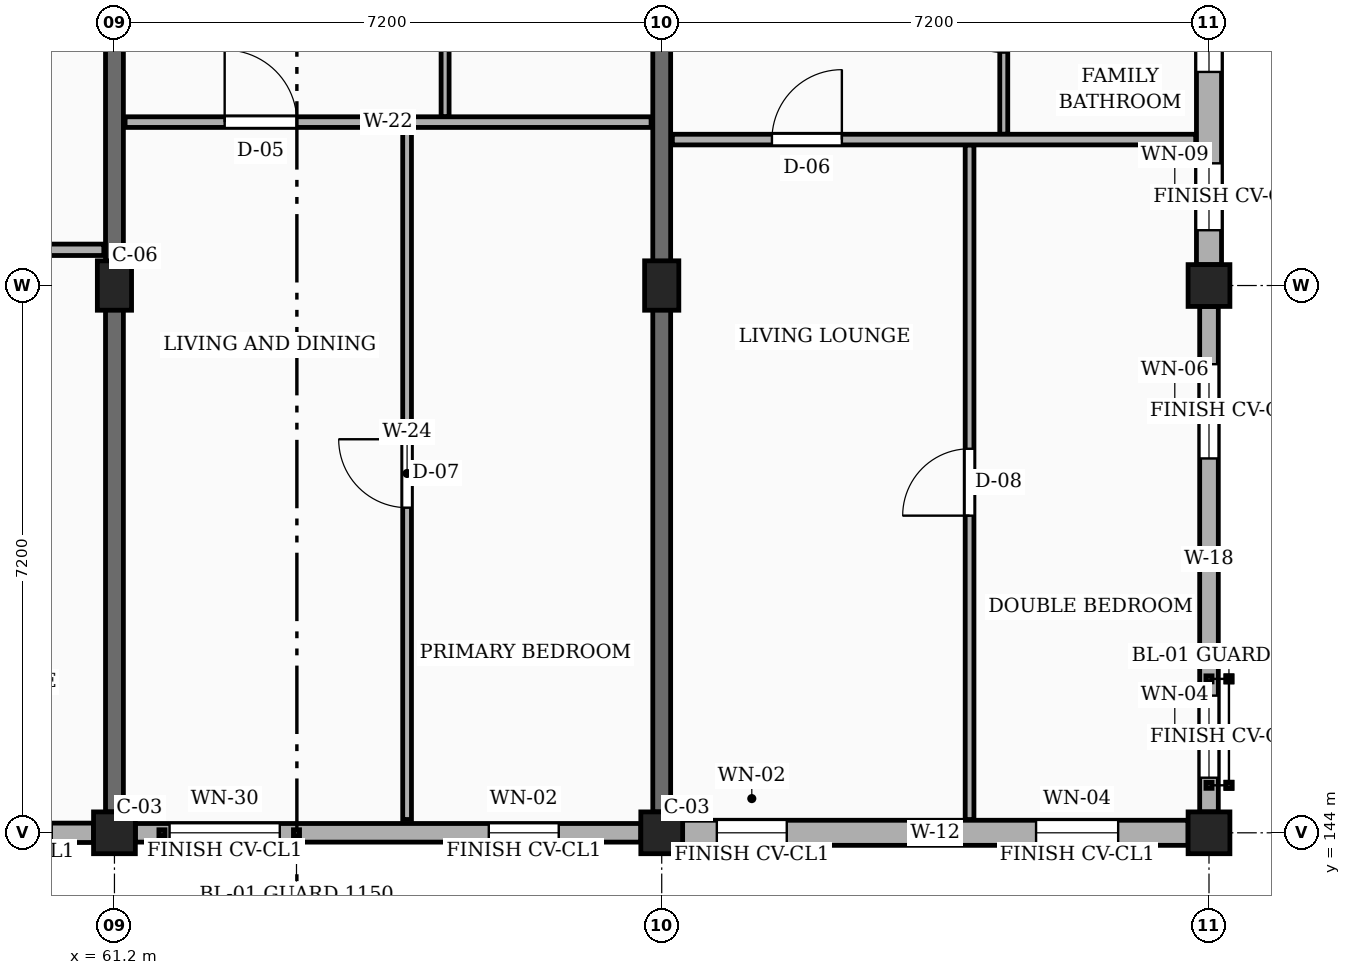
"""IFC4 building model, lengths in metres.
Left out: names, types, materials, properties, quantities, classifications, styles, units other than length and angle.
Written with IfcOpenShell. Run it as: python <this file> out.ifc"""

import sys

from ifc_helpers import new_model, si_unit, direction, frame, frame_2d, origin, origin_2d, place, context, subcontext, project, spatial, rectangle, extrude, element, fill, save


model = new_model("IFC4")
c1 = context("Model", 3, precision=1e-05, world=origin(), true_north=direction((0.0, 1.0)))
c2 = subcontext(c1, "Body", "Model", "MODEL_VIEW")
j1 = project(units=[si_unit("LENGTHUNIT", "METRE"), si_unit("PLANEANGLEUNIT", "RADIAN")], contexts=[c1])
p1 = place(None, origin())
s1 = spatial("IfcSite", under=j1, at=p1, CompositionType="ELEMENT")
p2 = place(p1, origin())
s2 = spatial("IfcBuilding", under=s1, at=p2, CompositionType="ELEMENT")
p3 = place(p2, frame((0.0, 0.0, 20.25)))
s3 = spatial("IfcBuildingStorey", under=s2, at=p3, CompositionType="ELEMENT", Elevation=20.25)
p4 = place(p3, frame((61.2, 144.0, 0.0), z_axis=(0.0, 0.0, 1.0), x_axis=(1.0, 0.0, 0.0)))
e1 = element("IfcColumn", 1, at=p4, inside=s3, PredefinedType="COLUMN", context=c2, shape_type="SweptSolid", body=[
    extrude(rectangle(XDim=0.55, YDim=0.55, at=origin_2d()), origin(), (0.0, 0.0, 1.0), 3.15),
])
p5 = place(p3, frame((61.2, 151.2, 0.0), z_axis=(0.0, 0.0, 1.0), x_axis=(1.0, 0.0, 0.0)))
e2 = element("IfcColumn", 2, at=p5, inside=s3, PredefinedType="COLUMN", context=c2, shape_type="SweptSolid", body=[
    extrude(rectangle(XDim=0.45, YDim=0.65, at=origin_2d()), origin(), (0.0, 0.0, 1.0), 3.15),
])
p6 = place(p3, frame((68.4, 144.0, 0.0), z_axis=(0.0, 0.0, 1.0), x_axis=(1.0, 0.0, 0.0)))
e3 = element("IfcColumn", 3, at=p6, inside=s3, PredefinedType="COLUMN", context=c2, shape_type="SweptSolid", body=[
    extrude(rectangle(XDim=0.55, YDim=0.55, at=origin_2d()), origin(), (0.0, 0.0, 1.0), 3.15),
])
p7 = place(p3, frame((68.4, 151.2, 0.0), z_axis=(0.0, 0.0, 1.0), x_axis=(1.0, 0.0, 0.0)))
e4 = element("IfcColumn", 4, at=p7, inside=s3, PredefinedType="COLUMN", context=c2, shape_type="SweptSolid", body=[
    extrude(rectangle(XDim=0.45, YDim=0.65, at=origin_2d()), origin(), (0.0, 0.0, 1.0), 3.15),
])
for number, where, z_axis, x_axis in (
    (5, (75.6, 144.0, 0.0), (0.0, 0.0, 1.0), (1.0, 0.0, 0.0)),
    (6, (75.6, 151.2, 0.0), (0.0, 0.0, 1.0), (1.0, 0.0, 0.0)),
):
    element("IfcColumn", number, at=place(p3, frame(where, z_axis=z_axis, x_axis=x_axis)), inside=s3, PredefinedType="COLUMN", context=c2, shape_type="SweptSolid", body=[
        extrude(rectangle(XDim=0.55, YDim=0.55, at=origin_2d()), origin(), (0.0, 0.0, 1.0), 3.15),
    ])
for number, where, z_axis, x_axis in (
    (7, (61.2, 144.275, 0.0), (0.0, 0.0, 1.0), (0.0, 1.0, 0.0)),
    (8, (68.4, 144.275, 0.0), (0.0, 0.0, 1.0), (0.0, 1.0, 0.0)),
):
    element("IfcWall", number, at=place(p3, frame(where, z_axis=z_axis, x_axis=x_axis)), inside=s3, PredefinedType="SOLIDWALL", context=c2, shape_type="SweptSolid", body=[
        extrude(rectangle(XDim=11.875, YDim=0.235, at=frame_2d((5.938, 0.0))), origin(), (0.0, 0.0, 1.0), 2.185),
    ])
p8 = place(p3, frame((54.275, 144.0, 0.0), z_axis=(0.0, 0.0, 1.0), x_axis=(1.0, 0.0, 0.0)))
e9 = element("IfcWall", 9, at=p8, inside=s3, PredefinedType="SOLIDWALL", context=c2, shape_type="SweptSolid", body=[
    extrude(rectangle(XDim=6.65, YDim=0.255, at=frame_2d((3.325, 0.0))), origin(), (0.0, 0.0, 1.0), 2.455),
])
p9 = place(p8, frame((0.45, 0.0, 0.78)))
e10 = element("IfcOpeningElement", 10, at=p9, cuts=e9, PredefinedType="OPENING", context=c2, shape_type="SweptSolid", body=[
    extrude(rectangle(XDim=1.25, YDim=1.44, at=frame_2d((0.625, 0.72))), frame((0.0, 0.137, 0.0), z_axis=(0.0, -1.0, 0.0), x_axis=(1.0, 0.0, 0.0)), (0.0, 0.0, 1.0), 0.275),
])
p10 = place(p8, frame((4.65, 0.0, 0.78)))
e11 = element("IfcOpeningElement", 11, at=p10, cuts=e9, PredefinedType="OPENING", context=c2, shape_type="SweptSolid", body=[
    extrude(rectangle(XDim=1.45, YDim=1.44, at=frame_2d((0.725, 0.72))), frame((0.0, 0.137, 0.0), z_axis=(0.0, -1.0, 0.0), x_axis=(1.0, 0.0, 0.0)), (0.0, 0.0, 1.0), 0.275),
])
p11 = place(p3, frame((61.475, 144.0, 0.0), z_axis=(0.0, 0.0, 1.0), x_axis=(1.0, 0.0, 0.0)))
e12 = element("IfcWall", 12, at=p11, inside=s3, PredefinedType="SOLIDWALL", context=c2, shape_type="SweptSolid", body=[
    extrude(rectangle(XDim=6.65, YDim=0.245, at=frame_2d((3.325, 0.0))), origin(), (0.0, 0.0, 1.0), 2.455),
])
p12 = place(p11, frame((0.45, 0.0, 0.78)))
e13 = element("IfcOpeningElement", 13, at=p12, cuts=e12, PredefinedType="OPENING", context=c2, shape_type="SweptSolid", body=[
    extrude(rectangle(XDim=1.45, YDim=1.44, at=frame_2d((0.725, 0.72))), frame((0.0, 0.133, 0.0), z_axis=(0.0, -1.0, 0.0), x_axis=(1.0, 0.0, 0.0)), (0.0, 0.0, 1.0), 0.265),
])
p13 = place(p11, frame((4.65, 0.0, 0.78)))
e14 = element("IfcOpeningElement", 14, at=p13, cuts=e12, PredefinedType="OPENING", context=c2, shape_type="SweptSolid", body=[
    extrude(rectangle(XDim=0.92, YDim=1.15, at=frame_2d((0.46, 0.575))), frame((0.0, 0.133, 0.0), z_axis=(0.0, -1.0, 0.0), x_axis=(1.0, 0.0, 0.0)), (0.0, 0.0, 1.0), 0.265),
])
p14 = place(p3, frame((68.675, 144.0, 0.0), z_axis=(0.0, 0.0, 1.0), x_axis=(1.0, 0.0, 0.0)))
e15 = element("IfcWall", 15, at=p14, inside=s3, PredefinedType="SOLIDWALL", context=c2, shape_type="SweptSolid", body=[
    extrude(rectangle(XDim=6.65, YDim=0.33, at=frame_2d((3.325, 0.0))), origin(), (0.0, 0.0, 1.0), 2.455),
])
p15 = place(p14, frame((0.45, 0.0, 0.78)))
e16 = element("IfcOpeningElement", 16, at=p15, cuts=e15, PredefinedType="OPENING", context=c2, shape_type="SweptSolid", body=[
    extrude(rectangle(XDim=0.92, YDim=1.15, at=frame_2d((0.46, 0.575))), frame((0.0, 0.175, 0.0), z_axis=(0.0, -1.0, 0.0), x_axis=(1.0, 0.0, 0.0)), (0.0, 0.0, 1.0), 0.35),
])
p16 = place(p14, frame((4.65, 0.0, 0.78)))
e17 = element("IfcOpeningElement", 17, at=p16, cuts=e15, PredefinedType="OPENING", context=c2, shape_type="SweptSolid", body=[
    extrude(rectangle(XDim=1.08, YDim=1.15, at=frame_2d((0.54, 0.575))), frame((0.0, 0.175, 0.0), z_axis=(0.0, -1.0, 0.0), x_axis=(1.0, 0.0, 0.0)), (0.0, 0.0, 1.0), 0.35),
])
p17 = place(p3, frame((75.6, 144.275, 0.0), z_axis=(0.0, 0.0, 1.0), x_axis=(0.0, 1.0, 0.0)))
e18 = element("IfcWall", 18, at=p17, inside=s3, PredefinedType="SOLIDWALL", context=c2, shape_type="SweptSolid", body=[
    extrude(rectangle(XDim=6.65, YDim=0.245, at=frame_2d((3.325, 0.0))), origin(), (0.0, 0.0, 1.0), 2.455),
])
p18 = place(p17, frame((0.45, 0.0, 0.78)))
e19 = element("IfcOpeningElement", 19, at=p18, cuts=e18, PredefinedType="OPENING", context=c2, shape_type="SweptSolid", body=[
    extrude(rectangle(XDim=1.08, YDim=1.15, at=frame_2d((0.54, 0.575))), frame((0.0, 0.133, 0.0), z_axis=(0.0, -1.0, 0.0), x_axis=(1.0, 0.0, 0.0)), (0.0, 0.0, 1.0), 0.265),
])
p19 = place(p17, frame((4.65, 0.0, 0.78)))
e20 = element("IfcOpeningElement", 20, at=p19, cuts=e18, PredefinedType="OPENING", context=c2, shape_type="SweptSolid", body=[
    extrude(rectangle(XDim=1.24, YDim=1.15, at=frame_2d((0.62, 0.575))), frame((0.0, 0.133, 0.0), z_axis=(0.0, -1.0, 0.0), x_axis=(1.0, 0.0, 0.0)), (0.0, 0.0, 1.0), 0.265),
])
p20 = place(p3, frame((75.6, 151.475, 0.0), z_axis=(0.0, 0.0, 1.0), x_axis=(0.0, 1.0, 0.0)))
e21 = element("IfcWall", 21, at=p20, inside=s3, PredefinedType="SOLIDWALL", context=c2, shape_type="SweptSolid", body=[
    extrude(rectangle(XDim=6.65, YDim=0.33, at=frame_2d((3.325, 0.0))), origin(), (0.0, 0.0, 1.0), 2.455),
])
p21 = place(p20, frame((0.452, 0.0, 0.78)))
e22 = element("IfcOpeningElement", 22, at=p21, cuts=e21, PredefinedType="OPENING", context=c2, shape_type="SweptSolid", body=[
    extrude(rectangle(XDim=0.88, YDim=1.26, at=frame_2d((0.44, 0.63))), frame((0.0, 0.175, 0.0), z_axis=(0.0, -1.0, 0.0), x_axis=(1.0, 0.0, 0.0)), (0.0, 0.0, 1.0), 0.35),
])
p22 = place(p20, frame((2.535, 0.0, 0.78)))
e23 = element("IfcOpeningElement", 23, at=p22, cuts=e21, PredefinedType="OPENING", context=c2, shape_type="SweptSolid", body=[
    extrude(rectangle(XDim=1.4, YDim=1.15, at=frame_2d((0.7, 0.575))), frame((0.0, 0.175, 0.0), z_axis=(0.0, -1.0, 0.0), x_axis=(1.0, 0.0, 0.0)), (0.0, 0.0, 1.0), 0.35),
])
p23 = place(p20, frame((5.188, 0.0, 0.78)))
e24 = element("IfcOpeningElement", 24, at=p23, cuts=e21, PredefinedType="OPENING", context=c2, shape_type="SweptSolid", body=[
    extrude(rectangle(XDim=0.96, YDim=1.26, at=frame_2d((0.48, 0.63))), frame((0.0, 0.175, 0.0), z_axis=(0.0, -1.0, 0.0), x_axis=(1.0, 0.0, 0.0)), (0.0, 0.0, 1.0), 0.35),
])
p24 = place(p3, frame((54.14, 151.67, 0.0), z_axis=(0.0, 0.0, 1.0), x_axis=(1.0, 0.0, 0.0)))
e25 = element("IfcWall", 25, at=p24, inside=s3, PredefinedType="PARTITIONING", context=c2, shape_type="SweptSolid", body=[
    extrude(rectangle(XDim=6.92, YDim=0.15, at=frame_2d((3.46, 0.0))), origin(), (0.0, 0.0, 1.0), 2.32),
])
p25 = place(p24, frame((4.66, 0.0, 0.0)))
e26 = element("IfcOpeningElement", 26, at=p25, cuts=e25, PredefinedType="OPENING", context=c2, shape_type="SweptSolid", body=[
    extrude(rectangle(XDim=0.95, YDim=2.1, at=frame_2d((0.475, 1.05))), frame((0.0, 0.085, 0.0), z_axis=(0.0, -1.0, 0.0), x_axis=(1.0, 0.0, 0.0)), (0.0, 0.0, 1.0), 0.17),
])
p26 = place(p3, frame((65.05, 144.175, 0.0), z_axis=(0.0, 0.0, 1.0), x_axis=(0.0, 1.0, 0.0)))
e27 = element("IfcWall", 27, at=p26, inside=s3, PredefinedType="PARTITIONING", context=c2, shape_type="SweptSolid", body=[
    extrude(rectangle(XDim=9.105, YDim=0.115, at=frame_2d((4.552, 0.0))), origin(), (0.0, 0.0, 1.0), 2.32),
])
p27 = place(p26, frame((4.103, 0.0, 0.0)))
e28 = element("IfcOpeningElement", 28, at=p27, cuts=e27, PredefinedType="OPENING", context=c2, shape_type="SweptSolid", body=[
    extrude(rectangle(XDim=0.9, YDim=2.1, at=frame_2d((0.45, 1.05))), frame((0.0, 0.067, 0.0), z_axis=(0.0, -1.0, 0.0), x_axis=(1.0, 0.0, 0.0)), (0.0, 0.0, 1.0), 0.135),
])
p28 = place(p3, frame((65.55, 153.42, 0.0), z_axis=(0.0, 0.0, 1.0), x_axis=(0.0, 1.0, 0.0)))
e29 = element("IfcWall", 29, at=p28, inside=s3, PredefinedType="PARTITIONING", context=c2, shape_type="SweptSolid", body=[
    extrude(rectangle(XDim=2.79, YDim=0.105, at=frame_2d((1.395, 0.0))), origin(), (0.0, 0.0, 1.0), 2.32),
])
p29 = place(p28, frame((0.945, 0.0, 0.0)))
e30 = element("IfcOpeningElement", 30, at=p29, cuts=e29, PredefinedType="OPENING", context=c2, shape_type="SweptSolid", body=[
    extrude(rectangle(XDim=0.9, YDim=2.05, at=frame_2d((0.45, 1.025))), frame((0.0, 0.062, 0.0), z_axis=(0.0, -1.0, 0.0), x_axis=(1.0, 0.0, 0.0)), (0.0, 0.0, 1.0), 0.125),
])
p30 = place(p3, frame((61.34, 153.35, 0.0), z_axis=(0.0, 0.0, 1.0), x_axis=(1.0, 0.0, 0.0)))
e31 = element("IfcWall", 31, at=p30, inside=s3, PredefinedType="PARTITIONING", context=c2, shape_type="SweptSolid", body=[
    extrude(rectangle(XDim=6.92, YDim=0.14, at=frame_2d((3.46, 0.0))), origin(), (0.0, 0.0, 1.0), 2.32),
])
p31 = place(p30, frame((1.31, 0.0, 0.0)))
e32 = element("IfcOpeningElement", 32, at=p31, cuts=e31, PredefinedType="OPENING", context=c2, shape_type="SweptSolid", body=[
    extrude(rectangle(XDim=0.95, YDim=2.1, at=frame_2d((0.475, 1.05))), frame((0.0, 0.08, 0.0), z_axis=(0.0, -1.0, 0.0), x_axis=(1.0, 0.0, 0.0)), (0.0, 0.0, 1.0), 0.16),
])
p32 = place(p3, frame((72.45, 144.175, 0.0), z_axis=(0.0, 0.0, 1.0), x_axis=(0.0, 1.0, 0.0)))
e33 = element("IfcWall", 33, at=p32, inside=s3, PredefinedType="PARTITIONING", context=c2, shape_type="SweptSolid", body=[
    extrude(rectangle(XDim=8.875, YDim=0.115, at=frame_2d((4.438, 0.0))), origin(), (0.0, 0.0, 1.0), 2.32),
])
p33 = place(p32, frame((3.998, 0.0, 0.0)))
e34 = element("IfcOpeningElement", 34, at=p33, cuts=e33, PredefinedType="OPENING", context=c2, shape_type="SweptSolid", body=[
    extrude(rectangle(XDim=0.88, YDim=2.08, at=frame_2d((0.44, 1.04))), frame((0.0, 0.067, 0.0), z_axis=(0.0, -1.0, 0.0), x_axis=(1.0, 0.0, 0.0)), (0.0, 0.0, 1.0), 0.135),
])
p34 = place(p3, frame((72.9, 153.19, 0.0), z_axis=(0.0, 0.0, 1.0), x_axis=(0.0, 1.0, 0.0)))
e35 = element("IfcWall", 35, at=p34, inside=s3, PredefinedType="PARTITIONING", context=c2, shape_type="SweptSolid", body=[
    extrude(rectangle(XDim=3.02, YDim=0.105, at=frame_2d((1.51, 0.0))), origin(), (0.0, 0.0, 1.0), 2.32),
])
p35 = place(p34, frame((1.075, 0.0, 0.0)))
e36 = element("IfcOpeningElement", 36, at=p35, cuts=e35, PredefinedType="OPENING", context=c2, shape_type="SweptSolid", body=[
    extrude(rectangle(XDim=0.87, YDim=2.05, at=frame_2d((0.435, 1.025))), frame((0.0, 0.062, 0.0), z_axis=(0.0, -1.0, 0.0), x_axis=(1.0, 0.0, 0.0)), (0.0, 0.0, 1.0), 0.125),
])
p36 = place(p3, frame((68.54, 153.12, 0.0), z_axis=(0.0, 0.0, 1.0), x_axis=(1.0, 0.0, 0.0)))
e37 = element("IfcWall", 37, at=p36, inside=s3, PredefinedType="PARTITIONING", context=c2, shape_type="SweptSolid", body=[
    extrude(rectangle(XDim=6.885, YDim=0.14, at=frame_2d((3.442, 0.0))), origin(), (0.0, 0.0, 1.0), 2.32),
])
p37 = place(p36, frame((1.31, 0.0, 0.0)))
e38 = element("IfcOpeningElement", 38, at=p37, cuts=e37, PredefinedType="OPENING", context=c2, shape_type="SweptSolid", body=[
    extrude(rectangle(XDim=0.92, YDim=2.1, at=frame_2d((0.46, 1.05))), frame((0.0, 0.08, 0.0), z_axis=(0.0, -1.0, 0.0), x_axis=(1.0, 0.0, 0.0)), (0.0, 0.0, 1.0), 0.16),
])
p38 = place(p12, origin())
e39 = element("IfcWindow", 39, at=p38, inside=s3, PartitioningType="SINGLE_PANEL", PredefinedType="WINDOW", context=c2, shape_type="SweptSolid", body=[
    extrude(rectangle(XDim=1.45, YDim=1.44, at=frame_2d((0.725, 0.72))), frame((0.0, 0.03, 0.0), z_axis=(0.0, -1.0, 0.0), x_axis=(1.0, 0.0, 0.0)), (0.0, 0.0, 1.0), 0.06),
])
fill(e13, e39)
p39 = place(p13, origin())
e40 = element("IfcWindow", 40, at=p39, inside=s3, PartitioningType="SINGLE_PANEL", PredefinedType="WINDOW", context=c2, shape_type="SweptSolid", body=[
    extrude(rectangle(XDim=0.92, YDim=1.15, at=frame_2d((0.46, 0.575))), frame((0.0, 0.03, 0.0), z_axis=(0.0, -1.0, 0.0), x_axis=(1.0, 0.0, 0.0)), (0.0, 0.0, 1.0), 0.06),
])
fill(e14, e40)
p40 = place(p15, origin())
e41 = element("IfcWindow", 41, at=p40, inside=s3, PartitioningType="SINGLE_PANEL", PredefinedType="WINDOW", context=c2, shape_type="SweptSolid", body=[
    extrude(rectangle(XDim=0.92, YDim=1.15, at=frame_2d((0.46, 0.575))), frame((0.0, 0.03, 0.0), z_axis=(0.0, -1.0, 0.0), x_axis=(1.0, 0.0, 0.0)), (0.0, 0.0, 1.0), 0.06),
])
fill(e16, e41)
p41 = place(p16, origin())
e42 = element("IfcWindow", 42, at=p41, inside=s3, PartitioningType="SINGLE_PANEL", PredefinedType="WINDOW", context=c2, shape_type="SweptSolid", body=[
    extrude(rectangle(XDim=1.08, YDim=1.15, at=frame_2d((0.54, 0.575))), frame((0.0, 0.03, 0.0), z_axis=(0.0, -1.0, 0.0), x_axis=(1.0, 0.0, 0.0)), (0.0, 0.0, 1.0), 0.06),
])
fill(e17, e42)
p42 = place(p18, origin())
e43 = element("IfcWindow", 43, at=p42, inside=s3, PartitioningType="SINGLE_PANEL", PredefinedType="WINDOW", context=c2, shape_type="SweptSolid", body=[
    extrude(rectangle(XDim=1.08, YDim=1.15, at=frame_2d((0.54, 0.575))), frame((0.0, 0.03, 0.0), z_axis=(0.0, -1.0, 0.0), x_axis=(1.0, 0.0, 0.0)), (0.0, 0.0, 1.0), 0.06),
])
fill(e19, e43)
p43 = place(p19, origin())
e44 = element("IfcWindow", 44, at=p43, inside=s3, PartitioningType="SINGLE_PANEL", PredefinedType="WINDOW", context=c2, shape_type="SweptSolid", body=[
    extrude(rectangle(XDim=1.24, YDim=1.15, at=frame_2d((0.62, 0.575))), frame((0.0, 0.03, 0.0), z_axis=(0.0, -1.0, 0.0), x_axis=(1.0, 0.0, 0.0)), (0.0, 0.0, 1.0), 0.06),
])
fill(e20, e44)
p44 = place(p21, origin())
e45 = element("IfcWindow", 45, at=p44, inside=s3, PartitioningType="SINGLE_PANEL", PredefinedType="WINDOW", context=c2, shape_type="SweptSolid", body=[
    extrude(rectangle(XDim=0.88, YDim=1.26, at=frame_2d((0.44, 0.63))), frame((0.0, 0.03, 0.0), z_axis=(0.0, -1.0, 0.0), x_axis=(1.0, 0.0, 0.0)), (0.0, 0.0, 1.0), 0.06),
])
fill(e22, e45)
p45 = place(p22, origin())
e46 = element("IfcWindow", 46, at=p45, inside=s3, PartitioningType="SINGLE_PANEL", PredefinedType="WINDOW", context=c2, shape_type="SweptSolid", body=[
    extrude(rectangle(XDim=1.4, YDim=1.15, at=frame_2d((0.7, 0.575))), frame((0.0, 0.03, 0.0), z_axis=(0.0, -1.0, 0.0), x_axis=(1.0, 0.0, 0.0)), (0.0, 0.0, 1.0), 0.06),
])
fill(e23, e46)
p46 = place(p27, origin())
e47 = element("IfcDoor", 47, at=p46, inside=s3, OperationType="SINGLE_SWING_RIGHT", PredefinedType="DOOR", context=c2, shape_type="SweptSolid", body=[
    extrude(rectangle(XDim=0.9, YDim=2.1, at=frame_2d((0.45, 1.05))), frame((0.0, 0.025, 0.0), z_axis=(0.0, -1.0, 0.0), x_axis=(1.0, 0.0, 0.0)), (0.0, 0.0, 1.0), 0.05),
])
fill(e28, e47)
p47 = place(p31, origin())
e48 = element("IfcDoor", 48, at=p47, inside=s3, OperationType="SINGLE_SWING_LEFT", PredefinedType="DOOR", context=c2, shape_type="SweptSolid", body=[
    extrude(rectangle(XDim=0.95, YDim=2.1, at=frame_2d((0.475, 1.05))), frame((0.0, 0.025, 0.0), z_axis=(0.0, -1.0, 0.0), x_axis=(1.0, 0.0, 0.0)), (0.0, 0.0, 1.0), 0.05),
])
fill(e32, e48)
p48 = place(p33, origin())
e49 = element("IfcDoor", 49, at=p48, inside=s3, OperationType="SINGLE_SWING_LEFT", PredefinedType="DOOR", context=c2, shape_type="SweptSolid", body=[
    extrude(rectangle(XDim=0.88, YDim=2.08, at=frame_2d((0.44, 1.04))), frame((0.0, 0.025, 0.0), z_axis=(0.0, -1.0, 0.0), x_axis=(1.0, 0.0, 0.0)), (0.0, 0.0, 1.0), 0.05),
])
fill(e34, e49)
p49 = place(p35, origin())
e50 = element("IfcDoor", 50, at=p49, inside=s3, OperationType="SINGLE_SWING_RIGHT", PredefinedType="DOOR", context=c2, shape_type="SweptSolid", body=[
    extrude(rectangle(XDim=0.87, YDim=2.05, at=frame_2d((0.435, 1.025))), frame((0.0, 0.025, 0.0), z_axis=(0.0, -1.0, 0.0), x_axis=(1.0, 0.0, 0.0)), (0.0, 0.0, 1.0), 0.05),
])
fill(e36, e50)
p50 = place(p37, origin())
e51 = element("IfcDoor", 51, at=p50, inside=s3, OperationType="SINGLE_SWING_RIGHT", PredefinedType="DOOR", context=c2, shape_type="SweptSolid", body=[
    extrude(rectangle(XDim=0.92, YDim=2.1, at=frame_2d((0.46, 1.05))), frame((0.0, 0.025, 0.0), z_axis=(0.0, -1.0, 0.0), x_axis=(1.0, 0.0, 0.0)), (0.0, 0.0, 1.0), 0.05),
])
fill(e38, e51)
save(model, sys.argv[1])
